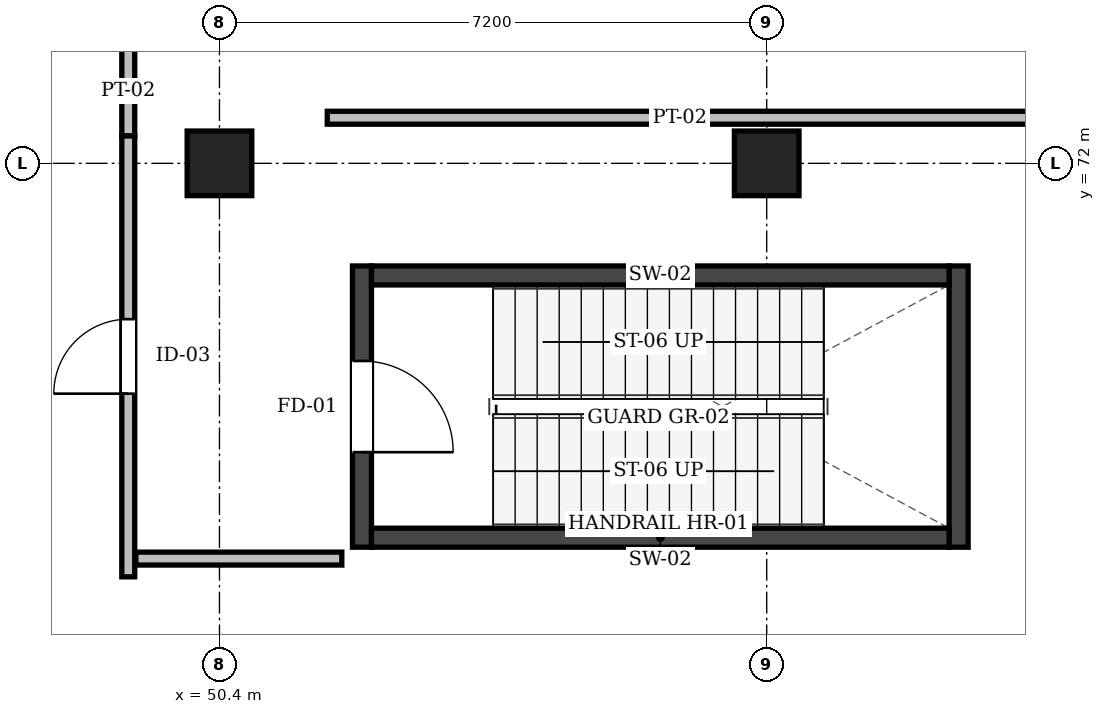
"""IFC4 building model, lengths in metres.
Left out: names, types, materials, properties, quantities, classifications, styles, units other than length and angle.
Written with IfcOpenShell. Run it as: python <this file> out.ifc"""

import sys

from ifc_helpers import new_model, si_unit, direction, frame, frame_2d, origin, origin_2d, place, context, subcontext, project, spatial, rectangle, extrude, element, fill, save


model = new_model("IFC4")
c1 = context("Model", 3, precision=1e-05, world=origin(), true_north=direction((0.0, 1.0)))
c2 = subcontext(c1, "Body", "Model", "MODEL_VIEW")
j1 = project(units=[si_unit("LENGTHUNIT", "METRE"), si_unit("PLANEANGLEUNIT", "RADIAN")], contexts=[c1])
p1 = place(None, origin())
s1 = spatial("IfcSite", under=j1, at=p1, CompositionType="ELEMENT")
p2 = place(p1, origin())
s2 = spatial("IfcBuilding", under=s1, at=p2, CompositionType="ELEMENT")
p3 = place(p2, frame((0.0, 0.0, 4.8)))
s3 = spatial("IfcBuildingStorey", under=s2, at=p3, CompositionType="ELEMENT", Elevation=4.8)
for number, where, z_axis, x_axis in (
    (1, (50.4, 72.0, 0.0), (0.0, 0.0, 1.0), (1.0, 0.0, 0.0)),
    (2, (57.6, 72.0, 0.0), (0.0, 0.0, 1.0), (1.0, 0.0, 0.0)),
):
    element("IfcColumn", number, at=place(p3, frame(where, z_axis=z_axis, x_axis=x_axis)), inside=s3, PredefinedType="COLUMN", context=c2, shape_type="SweptSolid", body=[
        extrude(rectangle(XDim=0.85, YDim=0.85, at=origin_2d()), origin(), (0.0, 0.0, 1.0), 4.8),
    ])
p4 = place(p3, frame((52.275, 66.95, 0.0), z_axis=(0.0, 0.0, 1.0), x_axis=(0.0, 1.0, 0.0)))
e3 = element("IfcWall", 3, at=p4, inside=s3, PredefinedType="SHEAR", context=c2, shape_type="SweptSolid", body=[
    extrude(rectangle(XDim=3.7, YDim=0.25, at=frame_2d((1.85, 0.0))), origin(), (0.0, 0.0, 1.0), 4.55),
])
p5 = place(p4, frame((1.25, 0.0, 0.0)))
e4 = element("IfcOpeningElement", 4, at=p5, cuts=e3, PredefinedType="OPENING", context=c2, shape_type="SweptSolid", body=[
    extrude(rectangle(XDim=1.2, YDim=2.15, at=frame_2d((0.6, 1.075))), frame((0.0, 0.137, 0.0), z_axis=(0.0, -1.0, 0.0), x_axis=(1.0, 0.0, 0.0)), (0.0, 0.0, 1.0), 0.274),
])
p6 = place(p3, frame((60.125, 66.95, 0.0), z_axis=(0.0, 0.0, 1.0), x_axis=(0.0, 1.0, 0.0)))
e5 = element("IfcWall", 5, at=p6, inside=s3, PredefinedType="SHEAR", context=c2, shape_type="SweptSolid", body=[
    extrude(rectangle(XDim=3.7, YDim=0.25, at=frame_2d((1.85, 0.0))), origin(), (0.0, 0.0, 1.0), 4.55),
])
for number, where, z_axis, x_axis in (
    (6, (52.4, 67.075, 0.0), (0.0, 0.0, 1.0), (1.0, 0.0, 0.0)),
    (7, (52.4, 70.525, 0.0), (0.0, 0.0, 1.0), (1.0, 0.0, 0.0)),
):
    element("IfcWall", number, at=place(p3, frame(where, z_axis=z_axis, x_axis=x_axis)), inside=s3, PredefinedType="SHEAR", context=c2, shape_type="SweptSolid", body=[
        extrude(rectangle(XDim=7.6, YDim=0.25, at=frame_2d((3.8, 0.0))), origin(), (0.0, 0.0, 1.0), 4.55),
    ])
p7 = place(p3, frame((51.819, 72.6, 0.0), z_axis=(0.0, 0.0, 1.0), x_axis=(1.0, 0.0, 0.0)))
e8 = element("IfcWall", 8, at=p7, inside=s3, PredefinedType="PARTITIONING", context=c2, shape_type="SweptSolid", body=[
    extrude(rectangle(XDim=9.28, YDim=0.17, at=frame_2d((4.64, 0.0))), origin(), (0.0, 0.0, 1.0), 4.46),
])
p8 = place(p3, frame((49.2, 72.36, 0.0), z_axis=(0.0, 0.0, 1.0), x_axis=(0.0, 1.0, 0.0)))
e9 = element("IfcWall", 9, at=p8, inside=s3, PredefinedType="PARTITIONING", context=c2, shape_type="SweptSolid", body=[
    extrude(rectangle(XDim=2.94, YDim=0.17, at=frame_2d((1.47, 0.0))), origin(), (0.0, 0.0, 1.0), 4.46),
])
p9 = place(p3, frame((49.2, 66.56, 0.0), z_axis=(0.0, 0.0, 1.0), x_axis=(0.0, 1.0, 0.0)))
e10 = element("IfcWall", 10, at=p9, inside=s3, PredefinedType="PARTITIONING", context=c2, shape_type="SweptSolid", body=[
    extrude(rectangle(XDim=5.8, YDim=0.17, at=frame_2d((2.9, 0.0))), origin(), (0.0, 0.0, 1.0), 4.46),
])
p10 = place(p9, frame((2.41, 0.0, 0.0)))
e11 = element("IfcOpeningElement", 11, at=p10, cuts=e10, PredefinedType="OPENING", context=c2, shape_type="SweptSolid", body=[
    extrude(rectangle(XDim=0.98, YDim=2.14, at=frame_2d((0.49, 1.07))), frame((0.0, 0.097, 0.0), z_axis=(0.0, -1.0, 0.0), x_axis=(1.0, 0.0, 0.0)), (0.0, 0.0, 1.0), 0.194),
])
p11 = place(p3, frame((49.3, 66.8, 0.0), z_axis=(0.0, 0.0, 1.0), x_axis=(1.0, 0.0, 0.0)))
e12 = element("IfcWall", 12, at=p11, inside=s3, PredefinedType="PARTITIONING", context=c2, shape_type="SweptSolid", body=[
    extrude(rectangle(XDim=2.71, YDim=0.17, at=frame_2d((1.355, 0.0))), origin(), (0.0, 0.0, 1.0), 4.46),
])
p12 = place(p5, frame((1.2, 0.0, 0.0), z_axis=(0.0, 0.0, 1.0), x_axis=(-1.0, 0.0, 0.0)))
e13 = element("IfcDoor", 13, at=p12, inside=s3, OperationType="SINGLE_SWING_RIGHT", PredefinedType="DOOR", context=c2, shape_type="SweptSolid", body=[
    extrude(rectangle(XDim=1.2, YDim=2.15, at=frame_2d((0.6, 1.075))), frame((0.0, 0.025, 0.0), z_axis=(0.0, -1.0, 0.0), x_axis=(1.0, 0.0, 0.0)), (0.0, 0.0, 1.0), 0.05),
])
fill(e4, e13)
p13 = place(p10, origin())
e14 = element("IfcDoor", 14, at=p13, inside=s3, OperationType="SINGLE_SWING_LEFT", PredefinedType="DOOR", context=c2, shape_type="SweptSolid", body=[
    extrude(rectangle(XDim=0.98, YDim=2.14, at=frame_2d((0.49, 1.07))), frame((0.0, 0.025, 0.0), z_axis=(0.0, -1.0, 0.0), x_axis=(1.0, 0.0, 0.0)), (0.0, 0.0, 1.0), 0.05),
])
fill(e11, e14)
save(model, sys.argv[1])
